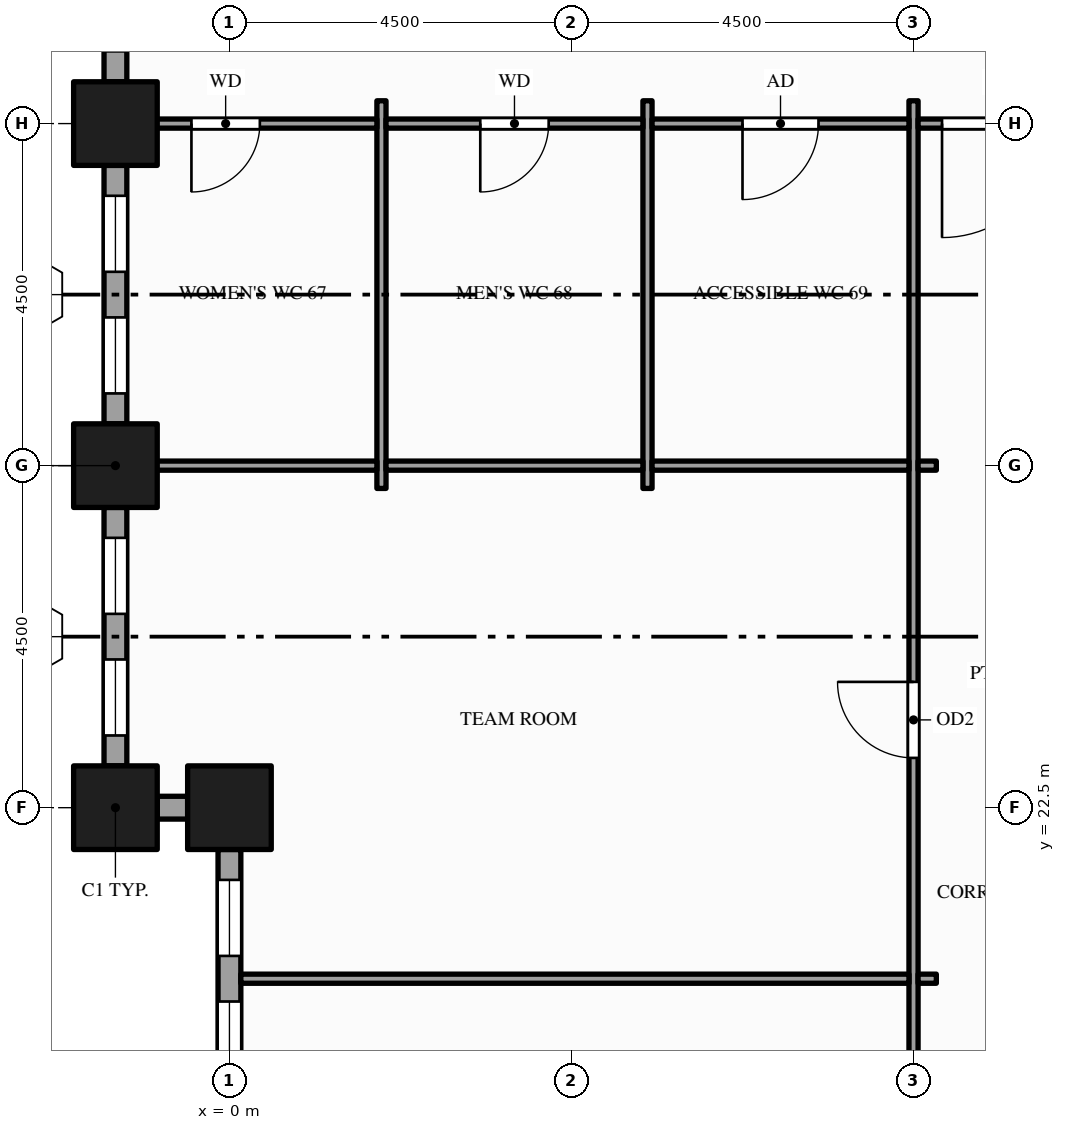
"""IFC4 building model, lengths in metres.
Left out: names, types, materials, properties, quantities, classifications, styles, units other than length and angle.
Written with IfcOpenShell. Run it as: python <this file> out.ifc"""

import sys

from ifc_helpers import new_model, si_unit, direction, frame, frame_2d, origin, origin_2d, place, context, subcontext, project, spatial, rectangle, hollow_rectangle, extrude, element, fill, save


model = new_model("IFC4")
c1 = context("Model", 3, precision=1e-05, world=origin(), true_north=direction((0.0, 1.0)))
c2 = subcontext(c1, "Body", "Model", "MODEL_VIEW")
j1 = project(units=[si_unit("LENGTHUNIT", "METRE"), si_unit("PLANEANGLEUNIT", "RADIAN")], contexts=[c1])
p1 = place(None, origin())
s1 = spatial("IfcSite", under=j1, at=p1, CompositionType="ELEMENT")
p2 = place(p1, origin())
s2 = spatial("IfcBuilding", under=s1, at=p2, CompositionType="ELEMENT")
p3 = place(p2, frame((0.0, 0.0, 69.0)))
s3 = spatial("IfcBuildingStorey", under=s2, at=p3, CompositionType="ELEMENT", Elevation=69.0)
for number, where, z_axis, x_axis in (
    (1, (-1.5, 22.5, -0.15), (0.0, 0.0, 1.0), (1.0, 0.0, 0.0)),
    (2, (-1.5, 27.0, -0.15), (0.0, 0.0, 1.0), (1.0, 0.0, 0.0)),
    (3, (-1.5, 31.5, -0.15), (0.0, 0.0, 1.0), (1.0, 0.0, 0.0)),
    (4, (0.0, 22.5, -0.15), (0.0, 0.0, 1.0), (1.0, 0.0, 0.0)),
):
    element("IfcColumn", number, at=place(p3, frame(where, z_axis=z_axis, x_axis=x_axis)), inside=s3, PredefinedType="COLUMN", context=c2, shape_type="SweptSolid", body=[
        extrude(hollow_rectangle(XDim=1.1, YDim=1.1, WallThickness=0.06, at=origin_2d()), origin(), (0.0, 0.0, 1.0), 4.0),
    ])
p4 = place(p3, frame((-1.5, 35.45, 0.0), z_axis=(0.0, 0.0, 1.0), x_axis=(0.0, -1.0, 0.0)))
e5 = element("IfcWall", 5, at=p4, inside=s3, PredefinedType="STANDARD", context=c2, shape_type="SweptSolid", body=[
    extrude(rectangle(XDim=3.4, YDim=0.3, at=frame_2d((1.7, 0.0))), origin(), (0.0, 0.0, 1.0), 3.144),
])
p5 = place(p4, frame((0.4, 0.0, 0.9)))
e6 = element("IfcOpeningElement", 6, at=p5, cuts=e5, PredefinedType="OPENING", context=c2, shape_type="SweptSolid", body=[
    extrude(rectangle(XDim=1.0, YDim=2.0, at=frame_2d((0.5, 1.0))), frame((0.0, 0.16, 0.0), z_axis=(0.0, -1.0, 0.0), x_axis=(1.0, 0.0, 0.0)), (0.0, 0.0, 1.0), 0.32),
])
p6 = place(p4, frame((2.0, 0.0, 0.9)))
e7 = element("IfcOpeningElement", 7, at=p6, cuts=e5, PredefinedType="OPENING", context=c2, shape_type="SweptSolid", body=[
    extrude(rectangle(XDim=1.0, YDim=2.0, at=frame_2d((0.5, 1.0))), frame((0.0, 0.16, 0.0), z_axis=(0.0, -1.0, 0.0), x_axis=(1.0, 0.0, 0.0)), (0.0, 0.0, 1.0), 0.32),
])
p7 = place(p3, frame((-1.5, 30.95, 0.0), z_axis=(0.0, 0.0, 1.0), x_axis=(0.0, -1.0, 0.0)))
e8 = element("IfcWall", 8, at=p7, inside=s3, PredefinedType="STANDARD", context=c2, shape_type="SweptSolid", body=[
    extrude(rectangle(XDim=3.4, YDim=0.3, at=frame_2d((1.7, 0.0))), origin(), (0.0, 0.0, 1.0), 3.144),
])
p8 = place(p7, frame((0.4, 0.0, 0.9)))
e9 = element("IfcOpeningElement", 9, at=p8, cuts=e8, PredefinedType="OPENING", context=c2, shape_type="SweptSolid", body=[
    extrude(rectangle(XDim=1.0, YDim=2.0, at=frame_2d((0.5, 1.0))), frame((0.0, 0.16, 0.0), z_axis=(0.0, -1.0, 0.0), x_axis=(1.0, 0.0, 0.0)), (0.0, 0.0, 1.0), 0.32),
])
p9 = place(p7, frame((2.0, 0.0, 0.9)))
e10 = element("IfcOpeningElement", 10, at=p9, cuts=e8, PredefinedType="OPENING", context=c2, shape_type="SweptSolid", body=[
    extrude(rectangle(XDim=1.0, YDim=2.0, at=frame_2d((0.5, 1.0))), frame((0.0, 0.16, 0.0), z_axis=(0.0, -1.0, 0.0), x_axis=(1.0, 0.0, 0.0)), (0.0, 0.0, 1.0), 0.32),
])
p10 = place(p3, frame((-1.5, 26.45, 0.0), z_axis=(0.0, 0.0, 1.0), x_axis=(0.0, -1.0, 0.0)))
e11 = element("IfcWall", 11, at=p10, inside=s3, PredefinedType="STANDARD", context=c2, shape_type="SweptSolid", body=[
    extrude(rectangle(XDim=3.4, YDim=0.3, at=frame_2d((1.7, 0.0))), origin(), (0.0, 0.0, 1.0), 3.144),
])
p11 = place(p10, frame((0.4, 0.0, 0.9)))
e12 = element("IfcOpeningElement", 12, at=p11, cuts=e11, PredefinedType="OPENING", context=c2, shape_type="SweptSolid", body=[
    extrude(rectangle(XDim=1.0, YDim=2.0, at=frame_2d((0.5, 1.0))), frame((0.0, 0.16, 0.0), z_axis=(0.0, -1.0, 0.0), x_axis=(1.0, 0.0, 0.0)), (0.0, 0.0, 1.0), 0.32),
])
p12 = place(p10, frame((2.0, 0.0, 0.9)))
e13 = element("IfcOpeningElement", 13, at=p12, cuts=e11, PredefinedType="OPENING", context=c2, shape_type="SweptSolid", body=[
    extrude(rectangle(XDim=1.0, YDim=2.0, at=frame_2d((0.5, 1.0))), frame((0.0, 0.16, 0.0), z_axis=(0.0, -1.0, 0.0), x_axis=(1.0, 0.0, 0.0)), (0.0, 0.0, 1.0), 0.32),
])
p13 = place(p3, frame((-0.95, 22.5, 0.0), z_axis=(0.0, 0.0, 1.0), x_axis=(1.0, 0.0, 0.0)))
e14 = element("IfcWall", 14, at=p13, inside=s3, PredefinedType="STANDARD", context=c2, shape_type="SweptSolid", body=[
    extrude(rectangle(XDim=0.4, YDim=0.3, at=frame_2d((0.2, 0.0))), origin(), (0.0, 0.0, 1.0), 3.144),
])
p14 = place(p3, frame((0.0, 21.95, 0.0), z_axis=(0.0, 0.0, 1.0), x_axis=(0.0, -1.0, 0.0)))
e15 = element("IfcWall", 15, at=p14, inside=s3, PredefinedType="STANDARD", context=c2, shape_type="SweptSolid", body=[
    extrude(rectangle(XDim=3.4, YDim=0.3, at=frame_2d((1.7, 0.0))), origin(), (0.0, 0.0, 1.0), 3.144),
])
p15 = place(p14, frame((0.4, 0.0, 0.9)))
e16 = element("IfcOpeningElement", 16, at=p15, cuts=e15, PredefinedType="OPENING", context=c2, shape_type="SweptSolid", body=[
    extrude(rectangle(XDim=1.0, YDim=2.0, at=frame_2d((0.5, 1.0))), frame((0.0, 0.16, 0.0), z_axis=(0.0, -1.0, 0.0), x_axis=(1.0, 0.0, 0.0)), (0.0, 0.0, 1.0), 0.32),
])
p16 = place(p14, frame((2.0, 0.0, 0.9)))
e17 = element("IfcOpeningElement", 17, at=p16, cuts=e15, PredefinedType="OPENING", context=c2, shape_type="SweptSolid", body=[
    extrude(rectangle(XDim=1.0, YDim=2.0, at=frame_2d((0.5, 1.0))), frame((0.0, 0.16, 0.0), z_axis=(0.0, -1.0, 0.0), x_axis=(1.0, 0.0, 0.0)), (0.0, 0.0, 1.0), 0.32),
])
for number, where, z_axis, x_axis in (
    (18, (2.0, 26.7, 0.0), (0.0, 0.0, 1.0), (0.0, 1.0, 0.0)),
    (19, (5.5, 26.7, 0.0), (0.0, 0.0, 1.0), (0.0, 1.0, 0.0)),
):
    element("IfcWall", number, at=place(p3, frame(where, z_axis=z_axis, x_axis=x_axis)), inside=s3, PredefinedType="PARTITIONING", context=c2, shape_type="SweptSolid", body=[
        extrude(rectangle(XDim=5.1, YDim=0.12, at=frame_2d((2.55, 0.0))), origin(), (0.0, 0.0, 1.0), 3.85),
    ])
p17 = place(p3, frame((9.0, 10.95, 0.0), z_axis=(0.0, 0.0, 1.0), x_axis=(0.0, 1.0, 0.0)))
e20 = element("IfcWall", 20, at=p17, inside=s3, PredefinedType="PARTITIONING", context=c2, shape_type="SweptSolid", body=[
    extrude(rectangle(XDim=20.85, YDim=0.12, at=frame_2d((10.425, 0.0))), origin(), (0.0, 0.0, 1.0), 2.6),
])
p18 = place(p17, frame((3.9, 0.0, 0.0)))
e21 = element("IfcOpeningElement", 21, at=p18, cuts=e20, PredefinedType="OPENING", context=c2, shape_type="SweptSolid", body=[
    extrude(rectangle(XDim=1.8, YDim=2.1, at=frame_2d((0.9, 1.05))), frame((0.0, 0.07, 0.0), z_axis=(0.0, -1.0, 0.0), x_axis=(1.0, 0.0, 0.0)), (0.0, 0.0, 1.0), 0.14),
])
p19 = place(p17, frame((12.205, 0.0, 0.0)))
e22 = element("IfcOpeningElement", 22, at=p19, cuts=e20, PredefinedType="OPENING", context=c2, shape_type="SweptSolid", body=[
    extrude(rectangle(XDim=1.0, YDim=2.1, at=frame_2d((0.5, 1.05))), frame((0.0, 0.07, 0.0), z_axis=(0.0, -1.0, 0.0), x_axis=(1.0, 0.0, 0.0)), (0.0, 0.0, 1.0), 0.14),
])
p20 = place(p3, frame((0.15, 20.25, 0.0), z_axis=(0.0, 0.0, 1.0), x_axis=(1.0, 0.0, 0.0)))
e23 = element("IfcWall", 23, at=p20, inside=s3, PredefinedType="PARTITIONING", context=c2, shape_type="SweptSolid", body=[
    extrude(rectangle(XDim=8.79, YDim=0.12, at=frame_2d((4.395, 0.0))), origin(), (0.0, 0.0, 1.0), 2.938),
])
p21 = place(p3, frame((9.06, 20.25, 0.0), z_axis=(0.0, 0.0, 1.0), x_axis=(1.0, 0.0, 0.0)))
e24 = element("IfcWall", 24, at=p21, inside=s3, PredefinedType="PARTITIONING", context=c2, shape_type="SweptSolid", body=[
    extrude(rectangle(XDim=0.24, YDim=0.12, at=frame_2d((0.12, 0.0))), origin(), (0.0, 0.0, 1.0), 2.938),
])
p22 = place(p3, frame((-1.35, 27.0, 0.0), z_axis=(0.0, 0.0, 1.0), x_axis=(1.0, 0.0, 0.0)))
e25 = element("IfcWall", 25, at=p22, inside=s3, PredefinedType="PARTITIONING", context=c2, shape_type="SweptSolid", body=[
    extrude(rectangle(XDim=3.29, YDim=0.12, at=frame_2d((1.645, 0.0))), origin(), (0.0, 0.0, 1.0), 2.938),
])
for number, where, z_axis, x_axis in (
    (26, (2.06, 27.0, 0.0), (0.0, 0.0, 1.0), (1.0, 0.0, 0.0)),
    (27, (5.56, 27.0, 0.0), (0.0, 0.0, 1.0), (1.0, 0.0, 0.0)),
):
    element("IfcWall", number, at=place(p3, frame(where, z_axis=z_axis, x_axis=x_axis)), inside=s3, PredefinedType="PARTITIONING", context=c2, shape_type="SweptSolid", body=[
        extrude(rectangle(XDim=3.38, YDim=0.12, at=frame_2d((1.69, 0.0))), origin(), (0.0, 0.0, 1.0), 2.938),
    ])
p23 = place(p3, frame((9.06, 27.0, 0.0), z_axis=(0.0, 0.0, 1.0), x_axis=(1.0, 0.0, 0.0)))
e28 = element("IfcWall", 28, at=p23, inside=s3, PredefinedType="PARTITIONING", context=c2, shape_type="SweptSolid", body=[
    extrude(rectangle(XDim=0.24, YDim=0.12, at=frame_2d((0.12, 0.0))), origin(), (0.0, 0.0, 1.0), 2.938),
])
p24 = place(p3, frame((-1.35, 31.5, 0.0), z_axis=(0.0, 0.0, 1.0), x_axis=(1.0, 0.0, 0.0)))
e29 = element("IfcWall", 29, at=p24, inside=s3, PredefinedType="PARTITIONING", context=c2, shape_type="SweptSolid", body=[
    extrude(rectangle(XDim=3.29, YDim=0.12, at=frame_2d((1.645, 0.0))), origin(), (0.0, 0.0, 1.0), 2.938),
])
p25 = place(p24, frame((0.85, 0.0, 0.0)))
e30 = element("IfcOpeningElement", 30, at=p25, cuts=e29, PredefinedType="OPENING", context=c2, shape_type="SweptSolid", body=[
    extrude(rectangle(XDim=0.9, YDim=2.1, at=frame_2d((0.45, 1.05))), frame((0.0, 0.07, 0.0), z_axis=(0.0, -1.0, 0.0), x_axis=(1.0, 0.0, 0.0)), (0.0, 0.0, 1.0), 0.14),
])
p26 = place(p3, frame((2.06, 31.5, 0.0), z_axis=(0.0, 0.0, 1.0), x_axis=(1.0, 0.0, 0.0)))
e31 = element("IfcWall", 31, at=p26, inside=s3, PredefinedType="PARTITIONING", context=c2, shape_type="SweptSolid", body=[
    extrude(rectangle(XDim=3.38, YDim=0.12, at=frame_2d((1.69, 0.0))), origin(), (0.0, 0.0, 1.0), 2.938),
])
p27 = place(p26, frame((1.24, 0.0, 0.0)))
e32 = element("IfcOpeningElement", 32, at=p27, cuts=e31, PredefinedType="OPENING", context=c2, shape_type="SweptSolid", body=[
    extrude(rectangle(XDim=0.9, YDim=2.1, at=frame_2d((0.45, 1.05))), frame((0.0, 0.07, 0.0), z_axis=(0.0, -1.0, 0.0), x_axis=(1.0, 0.0, 0.0)), (0.0, 0.0, 1.0), 0.14),
])
p28 = place(p3, frame((5.56, 31.5, 0.0), z_axis=(0.0, 0.0, 1.0), x_axis=(1.0, 0.0, 0.0)))
e33 = element("IfcWall", 33, at=p28, inside=s3, PredefinedType="PARTITIONING", context=c2, shape_type="SweptSolid", body=[
    extrude(rectangle(XDim=3.38, YDim=0.12, at=frame_2d((1.69, 0.0))), origin(), (0.0, 0.0, 1.0), 2.938),
])
p29 = place(p28, frame((1.19, 0.0, 0.0)))
e34 = element("IfcOpeningElement", 34, at=p29, cuts=e33, PredefinedType="OPENING", context=c2, shape_type="SweptSolid", body=[
    extrude(rectangle(XDim=1.0, YDim=2.1, at=frame_2d((0.5, 1.05))), frame((0.0, 0.07, 0.0), z_axis=(0.0, -1.0, 0.0), x_axis=(1.0, 0.0, 0.0)), (0.0, 0.0, 1.0), 0.14),
])
p30 = place(p3, frame((9.06, 31.5, 0.0), z_axis=(0.0, 0.0, 1.0), x_axis=(1.0, 0.0, 0.0)))
e35 = element("IfcWall", 35, at=p30, inside=s3, PredefinedType="PARTITIONING", context=c2, shape_type="SweptSolid", body=[
    extrude(rectangle(XDim=2.13, YDim=0.12, at=frame_2d((1.065, 0.0))), origin(), (0.0, 0.0, 1.0), 2.938),
])
p31 = place(p30, frame((0.315, 0.0, 0.0)))
e36 = element("IfcOpeningElement", 36, at=p31, cuts=e35, PredefinedType="OPENING", context=c2, shape_type="SweptSolid", body=[
    extrude(rectangle(XDim=1.5, YDim=2.1, at=frame_2d((0.75, 1.05))), frame((0.0, 0.07, 0.0), z_axis=(0.0, -1.0, 0.0), x_axis=(1.0, 0.0, 0.0)), (0.0, 0.0, 1.0), 0.14),
])
p32 = place(p8, origin())
e37 = element("IfcWindow", 37, at=p32, inside=s3, PartitioningType="SINGLE_PANEL", PredefinedType="WINDOW", context=c2, shape_type="SweptSolid", body=[
    extrude(rectangle(XDim=1.0, YDim=2.0, at=frame_2d((0.5, 1.0))), frame((0.0, 0.03, 0.0), z_axis=(0.0, -1.0, 0.0), x_axis=(1.0, 0.0, 0.0)), (0.0, 0.0, 1.0), 0.06),
])
fill(e9, e37)
p33 = place(p9, origin())
e38 = element("IfcWindow", 38, at=p33, inside=s3, PartitioningType="SINGLE_PANEL", PredefinedType="WINDOW", context=c2, shape_type="SweptSolid", body=[
    extrude(rectangle(XDim=1.0, YDim=2.0, at=frame_2d((0.5, 1.0))), frame((0.0, 0.03, 0.0), z_axis=(0.0, -1.0, 0.0), x_axis=(1.0, 0.0, 0.0)), (0.0, 0.0, 1.0), 0.06),
])
fill(e10, e38)
p34 = place(p11, origin())
e39 = element("IfcWindow", 39, at=p34, inside=s3, PartitioningType="SINGLE_PANEL", PredefinedType="WINDOW", context=c2, shape_type="SweptSolid", body=[
    extrude(rectangle(XDim=1.0, YDim=2.0, at=frame_2d((0.5, 1.0))), frame((0.0, 0.03, 0.0), z_axis=(0.0, -1.0, 0.0), x_axis=(1.0, 0.0, 0.0)), (0.0, 0.0, 1.0), 0.06),
])
fill(e12, e39)
p35 = place(p12, origin())
e40 = element("IfcWindow", 40, at=p35, inside=s3, PartitioningType="SINGLE_PANEL", PredefinedType="WINDOW", context=c2, shape_type="SweptSolid", body=[
    extrude(rectangle(XDim=1.0, YDim=2.0, at=frame_2d((0.5, 1.0))), frame((0.0, 0.03, 0.0), z_axis=(0.0, -1.0, 0.0), x_axis=(1.0, 0.0, 0.0)), (0.0, 0.0, 1.0), 0.06),
])
fill(e13, e40)
p36 = place(p15, origin())
e41 = element("IfcWindow", 41, at=p36, inside=s3, PartitioningType="SINGLE_PANEL", PredefinedType="WINDOW", context=c2, shape_type="SweptSolid", body=[
    extrude(rectangle(XDim=1.0, YDim=2.0, at=frame_2d((0.5, 1.0))), frame((0.0, 0.03, 0.0), z_axis=(0.0, -1.0, 0.0), x_axis=(1.0, 0.0, 0.0)), (0.0, 0.0, 1.0), 0.06),
])
fill(e16, e41)
p37 = place(p16, origin())
e42 = element("IfcWindow", 42, at=p37, inside=s3, PartitioningType="SINGLE_PANEL", PredefinedType="WINDOW", context=c2, shape_type="SweptSolid", body=[
    extrude(rectangle(XDim=1.0, YDim=2.0, at=frame_2d((0.5, 1.0))), frame((0.0, 0.03, 0.0), z_axis=(0.0, -1.0, 0.0), x_axis=(1.0, 0.0, 0.0)), (0.0, 0.0, 1.0), 0.06),
])
fill(e17, e42)
p38 = place(p31, origin())
e43 = element("IfcDoor", 43, at=p38, inside=s3, OperationType="SINGLE_SWING_LEFT", PredefinedType="DOOR", context=c2, shape_type="SweptSolid", body=[
    extrude(rectangle(XDim=1.5, YDim=2.1, at=frame_2d((0.75, 1.05))), frame((0.0, 0.025, 0.0), z_axis=(0.0, -1.0, 0.0), x_axis=(1.0, 0.0, 0.0)), (0.0, 0.0, 1.0), 0.05),
])
fill(e36, e43)
p39 = place(p19, origin())
e44 = element("IfcDoor", 44, at=p39, inside=s3, OperationType="SINGLE_SWING_RIGHT", PredefinedType="DOOR", context=c2, shape_type="SweptSolid", body=[
    extrude(rectangle(XDim=1.0, YDim=2.1, at=frame_2d((0.5, 1.05))), frame((0.0, 0.025, 0.0), z_axis=(0.0, -1.0, 0.0), x_axis=(1.0, 0.0, 0.0)), (0.0, 0.0, 1.0), 0.05),
])
fill(e22, e44)
p40 = place(p25, origin())
e45 = element("IfcDoor", 45, at=p40, inside=s3, OperationType="SINGLE_SWING_LEFT", PredefinedType="DOOR", context=c2, shape_type="SweptSolid", body=[
    extrude(rectangle(XDim=0.9, YDim=2.1, at=frame_2d((0.45, 1.05))), frame((0.0, 0.025, 0.0), z_axis=(0.0, -1.0, 0.0), x_axis=(1.0, 0.0, 0.0)), (0.0, 0.0, 1.0), 0.05),
])
fill(e30, e45)
p41 = place(p27, origin())
e46 = element("IfcDoor", 46, at=p41, inside=s3, OperationType="SINGLE_SWING_LEFT", PredefinedType="DOOR", context=c2, shape_type="SweptSolid", body=[
    extrude(rectangle(XDim=0.9, YDim=2.1, at=frame_2d((0.45, 1.05))), frame((0.0, 0.025, 0.0), z_axis=(0.0, -1.0, 0.0), x_axis=(1.0, 0.0, 0.0)), (0.0, 0.0, 1.0), 0.05),
])
fill(e32, e46)
p42 = place(p29, origin())
e47 = element("IfcDoor", 47, at=p42, inside=s3, OperationType="SINGLE_SWING_LEFT", PredefinedType="DOOR", context=c2, shape_type="SweptSolid", body=[
    extrude(rectangle(XDim=1.0, YDim=2.1, at=frame_2d((0.5, 1.05))), frame((0.0, 0.025, 0.0), z_axis=(0.0, -1.0, 0.0), x_axis=(1.0, 0.0, 0.0)), (0.0, 0.0, 1.0), 0.05),
])
fill(e34, e47)
save(model, sys.argv[1])
